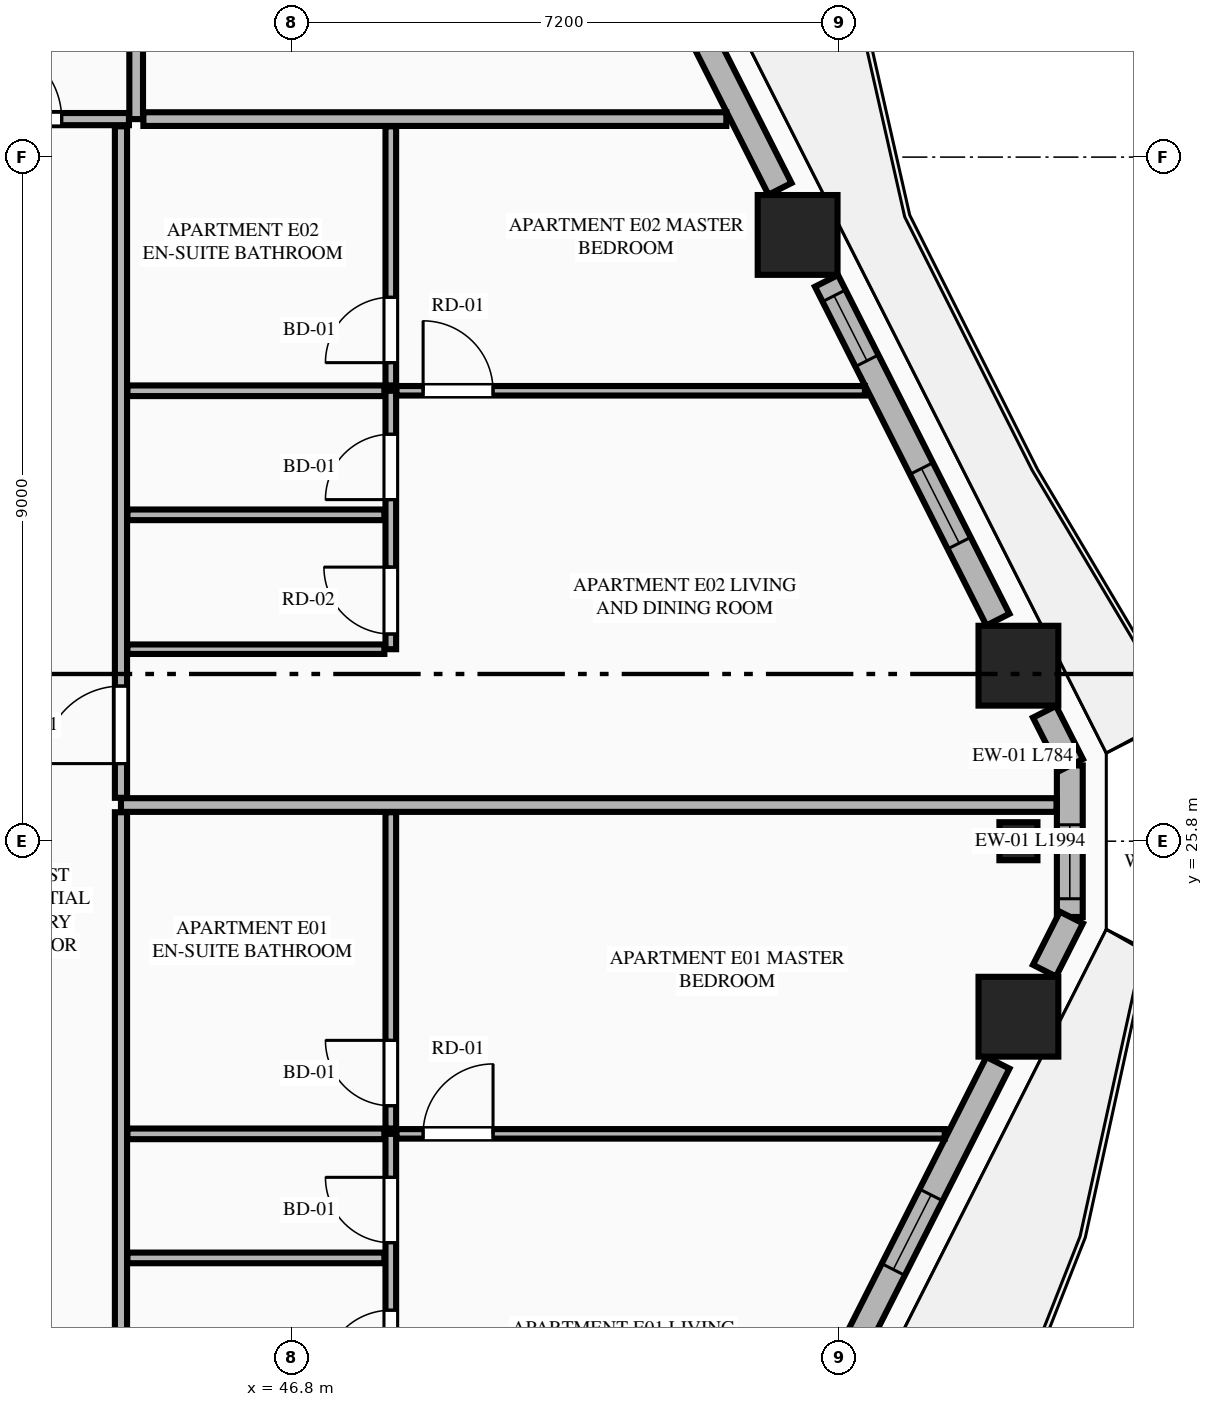
"""IFC4 building model, lengths in metres.
Left out: names, types, materials, properties, quantities, classifications, styles, units other than length and angle.
Written with IfcOpenShell. Run it as: python <this file> out.ifc"""

import sys

from ifc_helpers import new_model, si_unit, direction, frame, frame_2d, origin, origin_2d, place, context, subcontext, project, spatial, rectangle, extrude, element, fill, save


model = new_model("IFC4")
c1 = context("Model", 3, precision=1e-05, world=origin(), true_north=direction((0.0, 1.0)))
c2 = subcontext(c1, "Body", "Model", "MODEL_VIEW")
j1 = project(units=[si_unit("LENGTHUNIT", "METRE"), si_unit("PLANEANGLEUNIT", "RADIAN")], contexts=[c1])
p1 = place(None, origin())
s1 = spatial("IfcSite", under=j1, at=p1, CompositionType="ELEMENT")
p2 = place(p1, origin())
s2 = spatial("IfcBuilding", under=s1, at=p2, CompositionType="ELEMENT")
p3 = place(p2, frame((0.0, 0.0, 101.95)))
s3 = spatial("IfcBuildingStorey", under=s2, at=p3, CompositionType="ELEMENT", Elevation=101.95)
for number, where, z_axis, x_axis in (
    (1, (56.357, 23.491, 0.0), (0.0, 0.0, 1.0), (1.0, 0.0, 0.0)),
    (2, (56.357, 28.109, 0.0), (0.0, 0.0, 1.0), (1.0, 0.0, 0.0)),
    (3, (53.452, 33.776, 0.0), (0.0, 0.0, 1.0), (1.0, 0.0, 0.0)),
):
    element("IfcColumn", number, at=place(p3, frame(where, z_axis=z_axis, x_axis=x_axis)), inside=s3, PredefinedType="COLUMN", context=c2, shape_type="SweptSolid", body=[
        extrude(rectangle(XDim=1.05, YDim=1.05, at=origin_2d()), origin(), (0.0, 0.0, 1.0), 3.55),
    ])
p4 = place(p3, frame((56.357, 25.8, 0.0), z_axis=(0.0, 0.0, 1.0), x_axis=(0.0, 1.0, 0.0)))
e4 = element("IfcColumn", 4, at=p4, inside=s3, PredefinedType="PILASTER", context=c2, shape_type="SweptSolid", body=[
    extrude(rectangle(XDim=0.5, YDim=0.35, at=origin_2d()), origin(), (0.0, 0.0, 1.0), 3.55),
])
p5 = place(p3, frame((57.033, 24.803, 0.0), z_axis=(0.0, 0.0, 1.0), x_axis=(0.0, 1.0, 0.0)))
e5 = element("IfcWall", 5, at=p5, inside=s3, PredefinedType="STANDARD", context=c2, shape_type="SweptSolid", body=[
    extrude(rectangle(XDim=1.994, YDim=0.34, at=frame_2d((0.997, 0.0))), origin(), (0.0, 0.0, 1.0), 3.34),
])
p6 = place(p5, frame((0.24, 0.0, 0.75)))
e6 = element("IfcOpeningElement", 6, at=p6, cuts=e5, PredefinedType="OPENING", context=c2, shape_type="SweptSolid", body=[
    extrude(rectangle(XDim=0.973, YDim=2.0, at=frame_2d((0.486, 1.0))), frame((0.0, 0.18, 0.0), z_axis=(0.0, -1.0, 0.0), x_axis=(1.0, 0.0, 0.0)), (0.0, 0.0, 1.0), 0.36),
])
p7 = place(p3, frame((53.832, 18.428, 0.0), z_axis=(0.0, 0.0, 1.0), x_axis=(0.451431617681, 0.892305718102, 0.0)))
e7 = element("IfcWall", 7, at=p7, inside=s3, PredefinedType="STANDARD", context=c2, shape_type="SweptSolid", body=[
    extrude(rectangle(XDim=4.995, YDim=0.34, at=frame_2d((2.498, 0.0))), origin(), (0.0, 0.0, 1.0), 2.797),
])
p8 = place(p7, frame((1.947, 0.0, 0.75)))
e8 = element("IfcOpeningElement", 8, at=p8, cuts=e7, PredefinedType="OPENING", context=c2, shape_type="SweptSolid", body=[
    extrude(rectangle(XDim=1.1, YDim=1.897, at=frame_2d((0.55, 0.948))), frame((0.0, 0.18, 0.0), z_axis=(0.0, -1.0, 0.0), x_axis=(1.0, 0.0, 0.0)), (0.0, 0.0, 1.0), 0.36),
])
for number, where, z_axis, x_axis in (
    (9, (56.7, 24.097, 0.0), (0.0, 0.0, 1.0), (0.452, 0.892, 0.0)),
    (10, (57.054, 26.804, 0.0), (0.0, 0.0, 1.0), (-0.452, 0.892, 0.0)),
):
    element("IfcWall", number, at=place(p3, frame(where, z_axis=z_axis, x_axis=x_axis)), inside=s3, PredefinedType="STANDARD", context=c2, shape_type="SweptSolid", body=[
        extrude(rectangle(XDim=0.783, YDim=0.34, at=frame_2d((0.392, 0.0))), origin(), (0.0, 0.0, 1.0), 3.34),
    ])
p9 = place(p3, frame((56.087, 28.715, 0.0), z_axis=(0.0, 0.0, 1.0), x_axis=(-0.451431617681, 0.892305718102, 0.0)))
e11 = element("IfcWall", 11, at=p9, inside=s3, PredefinedType="STANDARD", context=c2, shape_type="SweptSolid", body=[
    extrude(rectangle(XDim=4.995, YDim=0.34, at=frame_2d((2.498, 0.0))), origin(), (0.0, 0.0, 1.0), 2.797),
])
p10 = place(p9, frame((1.128, 0.0, 0.75)))
e12 = element("IfcOpeningElement", 12, at=p10, cuts=e11, PredefinedType="OPENING", context=c2, shape_type="SweptSolid", body=[
    extrude(rectangle(XDim=1.1, YDim=1.897, at=frame_2d((0.55, 0.948))), frame((0.0, 0.18, 0.0), z_axis=(0.0, -1.0, 0.0), x_axis=(1.0, 0.0, 0.0)), (0.0, 0.0, 1.0), 0.36),
])
p11 = place(p9, frame((3.817, 0.0, 0.75)))
e13 = element("IfcOpeningElement", 13, at=p11, cuts=e11, PredefinedType="OPENING", context=c2, shape_type="SweptSolid", body=[
    extrude(rectangle(XDim=0.958, YDim=1.897, at=frame_2d((0.479, 0.948))), frame((0.0, 0.18, 0.0), z_axis=(0.0, -1.0, 0.0), x_axis=(1.0, 0.0, 0.0)), (0.0, 0.0, 1.0), 0.36),
])
p12 = place(p3, frame((53.22, 34.382, 0.0), z_axis=(0.0, 0.0, 1.0), x_axis=(-0.451567731634, 0.892236842855, 0.0)))
e14 = element("IfcWall", 14, at=p12, inside=s3, PredefinedType="STANDARD", context=c2, shape_type="SweptSolid", body=[
    extrude(rectangle(XDim=5.219, YDim=0.34, at=frame_2d((2.61, 0.0))), origin(), (0.0, 0.0, 1.0), 2.797),
])
p13 = place(p12, frame((2.699, 0.0, 0.0)))
e15 = element("IfcOpeningElement", 15, at=p13, cuts=e14, PredefinedType="OPENING", context=c2, shape_type="SweptSolid", body=[
    extrude(rectangle(XDim=1.1, YDim=2.25, at=frame_2d((0.55, 1.125))), frame((0.0, 0.18, 0.0), z_axis=(0.0, -1.0, 0.0), x_axis=(1.0, 0.0, 0.0)), (0.0, 0.0, 1.0), 0.36),
])
p14 = place(p3, frame((44.75, 35.3, 0.0), z_axis=(0.0, 0.0, 1.0), x_axis=(0.0, 1.0, 0.0)))
e16 = element("IfcWall", 16, at=p14, inside=s3, PredefinedType="PARTITIONING", context=c2, shape_type="SweptSolid", body=[
    extrude(rectangle(XDim=12.195, YDim=0.18, at=frame_2d((6.098, 0.0))), origin(), (0.0, 0.0, 1.0), 3.34),
])
p15 = place(p3, frame((28.663, 35.3, 0.0), z_axis=(0.0, 0.0, 1.0), x_axis=(1.0, 0.0, 0.0)))
e17 = element("IfcWall", 17, at=p15, inside=s3, PredefinedType="PARTITIONING", context=c2, shape_type="SweptSolid", body=[
    extrude(rectangle(XDim=15.992, YDim=0.16, at=frame_2d((7.996, 0.0))), origin(), (0.0, 0.0, 1.0), 3.34),
])
p16 = place(p15, frame((14.087, 0.0, 0.0)))
e18 = element("IfcOpeningElement", 18, at=p16, cuts=e17, PredefinedType="OPENING", context=c2, shape_type="SweptSolid", body=[
    extrude(rectangle(XDim=1.02, YDim=2.25, at=frame_2d((0.51, 1.125))), frame((0.0, 0.09, 0.0), z_axis=(0.0, -1.0, 0.0), x_axis=(1.0, 0.0, 0.0)), (0.0, 0.0, 1.0), 0.18),
])
p17 = place(p3, frame((44.845, 35.3, 0.0), z_axis=(0.0, 0.0, 1.0), x_axis=(1.0, 0.0, 0.0)))
e19 = element("IfcWall", 19, at=p17, inside=s3, PredefinedType="PARTITIONING", context=c2, shape_type="SweptSolid", body=[
    extrude(rectangle(XDim=7.669, YDim=0.18, at=frame_2d((3.834, 0.0))), origin(), (0.0, 0.0, 1.0), 3.34),
])
p18 = place(p3, frame((44.55, 16.595, 0.0), z_axis=(0.0, 0.0, 1.0), x_axis=(0.0, 1.0, 0.0)))
e20 = element("IfcWall", 20, at=p18, inside=s3, PredefinedType="PARTITIONING", context=c2, shape_type="SweptSolid", body=[
    extrude(rectangle(XDim=9.586, YDim=0.16, at=frame_2d((4.793, 0.0))), origin(), (0.0, 0.0, 1.0), 3.34),
])
p19 = place(p18, frame((0.45, 0.0, 0.0)))
e21 = element("IfcOpeningElement", 21, at=p19, cuts=e20, PredefinedType="OPENING", context=c2, shape_type="SweptSolid", body=[
    extrude(rectangle(XDim=1.02, YDim=2.25, at=frame_2d((0.51, 1.125))), frame((0.0, 0.09, 0.0), z_axis=(0.0, -1.0, 0.0), x_axis=(1.0, 0.0, 0.0)), (0.0, 0.0, 1.0), 0.18),
])
p20 = place(p3, frame((48.1, 18.55, 0.0), z_axis=(0.0, 0.0, 1.0), x_axis=(0.0, 1.0, 0.0)))
e22 = element("IfcWall", 22, at=p20, inside=s3, PredefinedType="PLUMBINGWALL", context=c2, shape_type="SweptSolid", body=[
    extrude(rectangle(XDim=3.4, YDim=0.14, at=frame_2d((1.7, 0.0))), origin(), (0.0, 0.0, 1.0), 3.34),
])
p21 = place(p20, frame((0.2, 0.0, 0.0)))
e23 = element("IfcOpeningElement", 23, at=p21, cuts=e22, PredefinedType="OPENING", context=c2, shape_type="SweptSolid", body=[
    extrude(rectangle(XDim=0.88, YDim=2.15, at=frame_2d((0.44, 1.075))), frame((0.0, 0.08, 0.0), z_axis=(0.0, -1.0, 0.0), x_axis=(1.0, 0.0, 0.0)), (0.0, 0.0, 1.0), 0.16),
])
p22 = place(p20, frame((1.968, 0.0, 0.0)))
e24 = element("IfcOpeningElement", 24, at=p22, cuts=e22, PredefinedType="OPENING", context=c2, shape_type="SweptSolid", body=[
    extrude(rectangle(XDim=0.86, YDim=2.1, at=frame_2d((0.43, 1.05))), frame((0.0, 0.08, 0.0), z_axis=(0.0, -1.0, 0.0), x_axis=(1.0, 0.0, 0.0)), (0.0, 0.0, 1.0), 0.16),
])
p23 = place(p3, frame((48.1, 22.02, 0.0), z_axis=(0.0, 0.0, 1.0), x_axis=(0.0, 1.0, 0.0)))
e25 = element("IfcWall", 25, at=p23, inside=s3, PredefinedType="PLUMBINGWALL", context=c2, shape_type="SweptSolid", body=[
    extrude(rectangle(XDim=4.161, YDim=0.14, at=frame_2d((2.081, 0.0))), origin(), (0.0, 0.0, 1.0), 3.34),
])
p24 = place(p23, frame((0.3, 0.0, 0.0)))
e26 = element("IfcOpeningElement", 26, at=p24, cuts=e25, PredefinedType="OPENING", context=c2, shape_type="SweptSolid", body=[
    extrude(rectangle(XDim=0.86, YDim=2.1, at=frame_2d((0.43, 1.05))), frame((0.0, 0.08, 0.0), z_axis=(0.0, -1.0, 0.0), x_axis=(1.0, 0.0, 0.0)), (0.0, 0.0, 1.0), 0.16),
])
p25 = place(p3, frame((44.635, 21.95, 0.0), z_axis=(0.0, 0.0, 1.0), x_axis=(1.0, 0.0, 0.0)))
e27 = element("IfcWall", 27, at=p25, inside=s3, PredefinedType="PLUMBINGWALL", context=c2, shape_type="SweptSolid", body=[
    extrude(rectangle(XDim=3.38, YDim=0.14, at=frame_2d((1.69, 0.0))), origin(), (0.0, 0.0, 1.0), 3.34),
])
p26 = place(p3, frame((48.175, 21.95, 0.0), z_axis=(0.0, 0.0, 1.0), x_axis=(1.0, 0.0, 0.0)))
e28 = element("IfcWall", 28, at=p26, inside=s3, PredefinedType="PARTITIONING", context=c2, shape_type="SweptSolid", body=[
    extrude(rectangle(XDim=7.213, YDim=0.125, at=frame_2d((3.606, 0.0))), origin(), (0.0, 0.0, 1.0), 3.34),
])
p27 = place(p26, frame((0.35, 0.0, 0.0)))
e29 = element("IfcOpeningElement", 29, at=p27, cuts=e28, PredefinedType="OPENING", context=c2, shape_type="SweptSolid", body=[
    extrude(rectangle(XDim=0.92, YDim=2.15, at=frame_2d((0.46, 1.075))), frame((0.0, 0.073, 0.0), z_axis=(0.0, -1.0, 0.0), x_axis=(1.0, 0.0, 0.0)), (0.0, 0.0, 1.0), 0.145),
])
p28 = place(p3, frame((44.635, 20.318, 0.0), z_axis=(0.0, 0.0, 1.0), x_axis=(1.0, 0.0, 0.0)))
e30 = element("IfcWall", 30, at=p28, inside=s3, PredefinedType="PLUMBINGWALL", context=c2, shape_type="SweptSolid", body=[
    extrude(rectangle(XDim=3.38, YDim=0.14, at=frame_2d((1.69, 0.0))), origin(), (0.0, 0.0, 1.0), 3.34),
])
p29 = place(p3, frame((44.55, 26.276, 0.0), z_axis=(0.0, 0.0, 1.0), x_axis=(1.0, 0.0, 0.0)))
e31 = element("IfcWall", 31, at=p29, inside=s3, PredefinedType="PARTITIONING", context=c2, shape_type="SweptSolid", body=[
    extrude(rectangle(XDim=12.308, YDim=0.18, at=frame_2d((6.154, 0.0))), origin(), (0.0, 0.0, 1.0), 3.34),
])
p30 = place(p3, frame((44.55, 26.371, 0.0), z_axis=(0.0, 0.0, 1.0), x_axis=(0.0, 1.0, 0.0)))
e32 = element("IfcWall", 32, at=p30, inside=s3, PredefinedType="PARTITIONING", context=c2, shape_type="SweptSolid", body=[
    extrude(rectangle(XDim=8.834, YDim=0.16, at=frame_2d((4.417, 0.0))), origin(), (0.0, 0.0, 1.0), 3.34),
])
p31 = place(p30, frame((0.45, 0.0, 0.0)))
e33 = element("IfcOpeningElement", 33, at=p31, cuts=e32, PredefinedType="OPENING", context=c2, shape_type="SweptSolid", body=[
    extrude(rectangle(XDim=1.02, YDim=2.25, at=frame_2d((0.51, 1.125))), frame((0.0, 0.09, 0.0), z_axis=(0.0, -1.0, 0.0), x_axis=(1.0, 0.0, 0.0)), (0.0, 0.0, 1.0), 0.18),
])
p32 = place(p3, frame((44.635, 28.326, 0.0), z_axis=(0.0, 0.0, 1.0), x_axis=(1.0, 0.0, 0.0)))
e34 = element("IfcWall", 34, at=p32, inside=s3, PredefinedType="PARTITIONING", context=c2, shape_type="SweptSolid", body=[
    extrude(rectangle(XDim=3.38, YDim=0.125, at=frame_2d((1.69, 0.0))), origin(), (0.0, 0.0, 1.0), 3.34),
])
p33 = place(p3, frame((48.1, 28.326, 0.0), z_axis=(0.0, 0.0, 1.0), x_axis=(0.0, 1.0, 0.0)))
e35 = element("IfcWall", 35, at=p33, inside=s3, PredefinedType="PLUMBINGWALL", context=c2, shape_type="SweptSolid", body=[
    extrude(rectangle(XDim=3.4, YDim=0.14, at=frame_2d((1.7, 0.0))), origin(), (0.0, 0.0, 1.0), 3.34),
])
p34 = place(p33, frame((0.2, 0.0, 0.0)))
e36 = element("IfcOpeningElement", 36, at=p34, cuts=e35, PredefinedType="OPENING", context=c2, shape_type="SweptSolid", body=[
    extrude(rectangle(XDim=0.88, YDim=2.15, at=frame_2d((0.44, 1.075))), frame((0.0, 0.08, 0.0), z_axis=(0.0, -1.0, 0.0), x_axis=(1.0, 0.0, 0.0)), (0.0, 0.0, 1.0), 0.16),
])
p35 = place(p33, frame((1.968, 0.0, 0.0)))
e37 = element("IfcOpeningElement", 37, at=p35, cuts=e35, PredefinedType="OPENING", context=c2, shape_type="SweptSolid", body=[
    extrude(rectangle(XDim=0.86, YDim=2.1, at=frame_2d((0.43, 1.05))), frame((0.0, 0.08, 0.0), z_axis=(0.0, -1.0, 0.0), x_axis=(1.0, 0.0, 0.0)), (0.0, 0.0, 1.0), 0.16),
])
p36 = place(p3, frame((48.1, 31.796, 0.0), z_axis=(0.0, 0.0, 1.0), x_axis=(0.0, 1.0, 0.0)))
e38 = element("IfcWall", 38, at=p36, inside=s3, PredefinedType="PLUMBINGWALL", context=c2, shape_type="SweptSolid", body=[
    extrude(rectangle(XDim=3.409, YDim=0.14, at=frame_2d((1.705, 0.0))), origin(), (0.0, 0.0, 1.0), 3.34),
])
p37 = place(p36, frame((0.3, 0.0, 0.0)))
e39 = element("IfcOpeningElement", 39, at=p37, cuts=e38, PredefinedType="OPENING", context=c2, shape_type="SweptSolid", body=[
    extrude(rectangle(XDim=0.86, YDim=2.1, at=frame_2d((0.43, 1.05))), frame((0.0, 0.08, 0.0), z_axis=(0.0, -1.0, 0.0), x_axis=(1.0, 0.0, 0.0)), (0.0, 0.0, 1.0), 0.16),
])
p38 = place(p3, frame((44.635, 31.726, 0.0), z_axis=(0.0, 0.0, 1.0), x_axis=(1.0, 0.0, 0.0)))
e40 = element("IfcWall", 40, at=p38, inside=s3, PredefinedType="PLUMBINGWALL", context=c2, shape_type="SweptSolid", body=[
    extrude(rectangle(XDim=3.38, YDim=0.14, at=frame_2d((1.69, 0.0))), origin(), (0.0, 0.0, 1.0), 3.34),
])
p39 = place(p3, frame((48.175, 31.726, 0.0), z_axis=(0.0, 0.0, 1.0), x_axis=(1.0, 0.0, 0.0)))
e41 = element("IfcWall", 41, at=p39, inside=s3, PredefinedType="PARTITIONING", context=c2, shape_type="SweptSolid", body=[
    extrude(rectangle(XDim=6.162, YDim=0.125, at=frame_2d((3.081, 0.0))), origin(), (0.0, 0.0, 1.0), 3.34),
])
p40 = place(p39, frame((0.35, 0.0, 0.0)))
e42 = element("IfcOpeningElement", 42, at=p40, cuts=e41, PredefinedType="OPENING", context=c2, shape_type="SweptSolid", body=[
    extrude(rectangle(XDim=0.92, YDim=2.15, at=frame_2d((0.46, 1.075))), frame((0.0, 0.073, 0.0), z_axis=(0.0, -1.0, 0.0), x_axis=(1.0, 0.0, 0.0)), (0.0, 0.0, 1.0), 0.145),
])
p41 = place(p3, frame((44.635, 30.094, 0.0), z_axis=(0.0, 0.0, 1.0), x_axis=(1.0, 0.0, 0.0)))
e43 = element("IfcWall", 43, at=p41, inside=s3, PredefinedType="PLUMBINGWALL", context=c2, shape_type="SweptSolid", body=[
    extrude(rectangle(XDim=3.38, YDim=0.14, at=frame_2d((1.69, 0.0))), origin(), (0.0, 0.0, 1.0), 3.34),
])
p42 = place(p8, origin())
e44 = element("IfcWindow", 44, at=p42, inside=s3, PartitioningType="SINGLE_PANEL", PredefinedType="WINDOW", context=c2, shape_type="SweptSolid", body=[
    extrude(rectangle(XDim=1.1, YDim=1.897, at=frame_2d((0.55, 0.948))), frame((0.0, 0.03, 0.0), z_axis=(0.0, -1.0, 0.0), x_axis=(1.0, 0.0, 0.0)), (0.0, 0.0, 1.0), 0.06),
])
fill(e8, e44)
p43 = place(p10, origin())
e45 = element("IfcWindow", 45, at=p43, inside=s3, PartitioningType="SINGLE_PANEL", PredefinedType="WINDOW", context=c2, shape_type="SweptSolid", body=[
    extrude(rectangle(XDim=1.1, YDim=1.897, at=frame_2d((0.55, 0.948))), frame((0.0, 0.03, 0.0), z_axis=(0.0, -1.0, 0.0), x_axis=(1.0, 0.0, 0.0)), (0.0, 0.0, 1.0), 0.06),
])
fill(e12, e45)
p44 = place(p16, origin())
e46 = element("IfcDoor", 46, at=p44, inside=s3, OperationType="SINGLE_SWING_LEFT", PredefinedType="DOOR", context=c2, shape_type="SweptSolid", body=[
    extrude(rectangle(XDim=1.02, YDim=2.25, at=frame_2d((0.51, 1.125))), frame((0.0, 0.025, 0.0), z_axis=(0.0, -1.0, 0.0), x_axis=(1.0, 0.0, 0.0)), (0.0, 0.0, 1.0), 0.05),
])
fill(e18, e46)
p45 = place(p21, origin())
e47 = element("IfcDoor", 47, at=p45, inside=s3, OperationType="SINGLE_SWING_LEFT", PredefinedType="DOOR", context=c2, shape_type="SweptSolid", body=[
    extrude(rectangle(XDim=0.88, YDim=2.15, at=frame_2d((0.44, 1.075))), frame((0.0, 0.025, 0.0), z_axis=(0.0, -1.0, 0.0), x_axis=(1.0, 0.0, 0.0)), (0.0, 0.0, 1.0), 0.05),
])
fill(e23, e47)
p46 = place(p22, origin())
e48 = element("IfcDoor", 48, at=p46, inside=s3, OperationType="SINGLE_SWING_RIGHT", PredefinedType="DOOR", context=c2, shape_type="SweptSolid", body=[
    extrude(rectangle(XDim=0.86, YDim=2.1, at=frame_2d((0.43, 1.05))), frame((0.0, 0.025, 0.0), z_axis=(0.0, -1.0, 0.0), x_axis=(1.0, 0.0, 0.0)), (0.0, 0.0, 1.0), 0.05),
])
fill(e24, e48)
p47 = place(p24, origin())
e49 = element("IfcDoor", 49, at=p47, inside=s3, OperationType="SINGLE_SWING_RIGHT", PredefinedType="DOOR", context=c2, shape_type="SweptSolid", body=[
    extrude(rectangle(XDim=0.86, YDim=2.1, at=frame_2d((0.43, 1.05))), frame((0.0, 0.025, 0.0), z_axis=(0.0, -1.0, 0.0), x_axis=(1.0, 0.0, 0.0)), (0.0, 0.0, 1.0), 0.05),
])
fill(e26, e49)
p48 = place(p27, origin())
e50 = element("IfcDoor", 50, at=p48, inside=s3, OperationType="SINGLE_SWING_RIGHT", PredefinedType="DOOR", context=c2, shape_type="SweptSolid", body=[
    extrude(rectangle(XDim=0.92, YDim=2.15, at=frame_2d((0.46, 1.075))), frame((0.0, 0.025, 0.0), z_axis=(0.0, -1.0, 0.0), x_axis=(1.0, 0.0, 0.0)), (0.0, 0.0, 1.0), 0.05),
])
fill(e29, e50)
p49 = place(p34, origin())
e51 = element("IfcDoor", 51, at=p49, inside=s3, OperationType="SINGLE_SWING_RIGHT", PredefinedType="DOOR", context=c2, shape_type="SweptSolid", body=[
    extrude(rectangle(XDim=0.88, YDim=2.15, at=frame_2d((0.44, 1.075))), frame((0.0, 0.025, 0.0), z_axis=(0.0, -1.0, 0.0), x_axis=(1.0, 0.0, 0.0)), (0.0, 0.0, 1.0), 0.05),
])
fill(e36, e51)
p50 = place(p35, origin())
e52 = element("IfcDoor", 52, at=p50, inside=s3, OperationType="SINGLE_SWING_LEFT", PredefinedType="DOOR", context=c2, shape_type="SweptSolid", body=[
    extrude(rectangle(XDim=0.86, YDim=2.1, at=frame_2d((0.43, 1.05))), frame((0.0, 0.025, 0.0), z_axis=(0.0, -1.0, 0.0), x_axis=(1.0, 0.0, 0.0)), (0.0, 0.0, 1.0), 0.05),
])
fill(e37, e52)
p51 = place(p37, origin())
e53 = element("IfcDoor", 53, at=p51, inside=s3, OperationType="SINGLE_SWING_LEFT", PredefinedType="DOOR", context=c2, shape_type="SweptSolid", body=[
    extrude(rectangle(XDim=0.86, YDim=2.1, at=frame_2d((0.43, 1.05))), frame((0.0, 0.025, 0.0), z_axis=(0.0, -1.0, 0.0), x_axis=(1.0, 0.0, 0.0)), (0.0, 0.0, 1.0), 0.05),
])
fill(e39, e53)
p52 = place(p31, origin())
e54 = element("IfcDoor", 54, at=p52, inside=s3, OperationType="SINGLE_SWING_LEFT", PredefinedType="DOOR", context=c2, shape_type="SweptSolid", body=[
    extrude(rectangle(XDim=1.02, YDim=2.25, at=frame_2d((0.51, 1.125))), frame((0.0, 0.025, 0.0), z_axis=(0.0, -1.0, 0.0), x_axis=(1.0, 0.0, 0.0)), (0.0, 0.0, 1.0), 0.05),
])
fill(e33, e54)
p53 = place(p40, origin())
e55 = element("IfcDoor", 55, at=p53, inside=s3, OperationType="SINGLE_SWING_LEFT", PredefinedType="DOOR", context=c2, shape_type="SweptSolid", body=[
    extrude(rectangle(XDim=0.92, YDim=2.15, at=frame_2d((0.46, 1.075))), frame((0.0, 0.025, 0.0), z_axis=(0.0, -1.0, 0.0), x_axis=(1.0, 0.0, 0.0)), (0.0, 0.0, 1.0), 0.05),
])
fill(e42, e55)
p54 = place(p11, origin())
e56 = element("IfcWindow", 56, at=p54, inside=s3, PartitioningType="SINGLE_PANEL", PredefinedType="WINDOW", context=c2, shape_type="SweptSolid", body=[
    extrude(rectangle(XDim=0.958, YDim=1.897, at=frame_2d((0.479, 0.948))), frame((0.0, 0.03, 0.0), z_axis=(0.0, -1.0, 0.0), x_axis=(1.0, 0.0, 0.0)), (0.0, 0.0, 1.0), 0.06),
])
fill(e13, e56)
p55 = place(p6, origin())
e57 = element("IfcWindow", 57, at=p55, inside=s3, PartitioningType="SINGLE_PANEL", PredefinedType="WINDOW", context=c2, shape_type="SweptSolid", body=[
    extrude(rectangle(XDim=0.973, YDim=2.0, at=frame_2d((0.486, 1.0))), frame((0.0, 0.03, 0.0), z_axis=(0.0, -1.0, 0.0), x_axis=(1.0, 0.0, 0.0)), (0.0, 0.0, 1.0), 0.06),
])
fill(e6, e57)
save(model, sys.argv[1])
